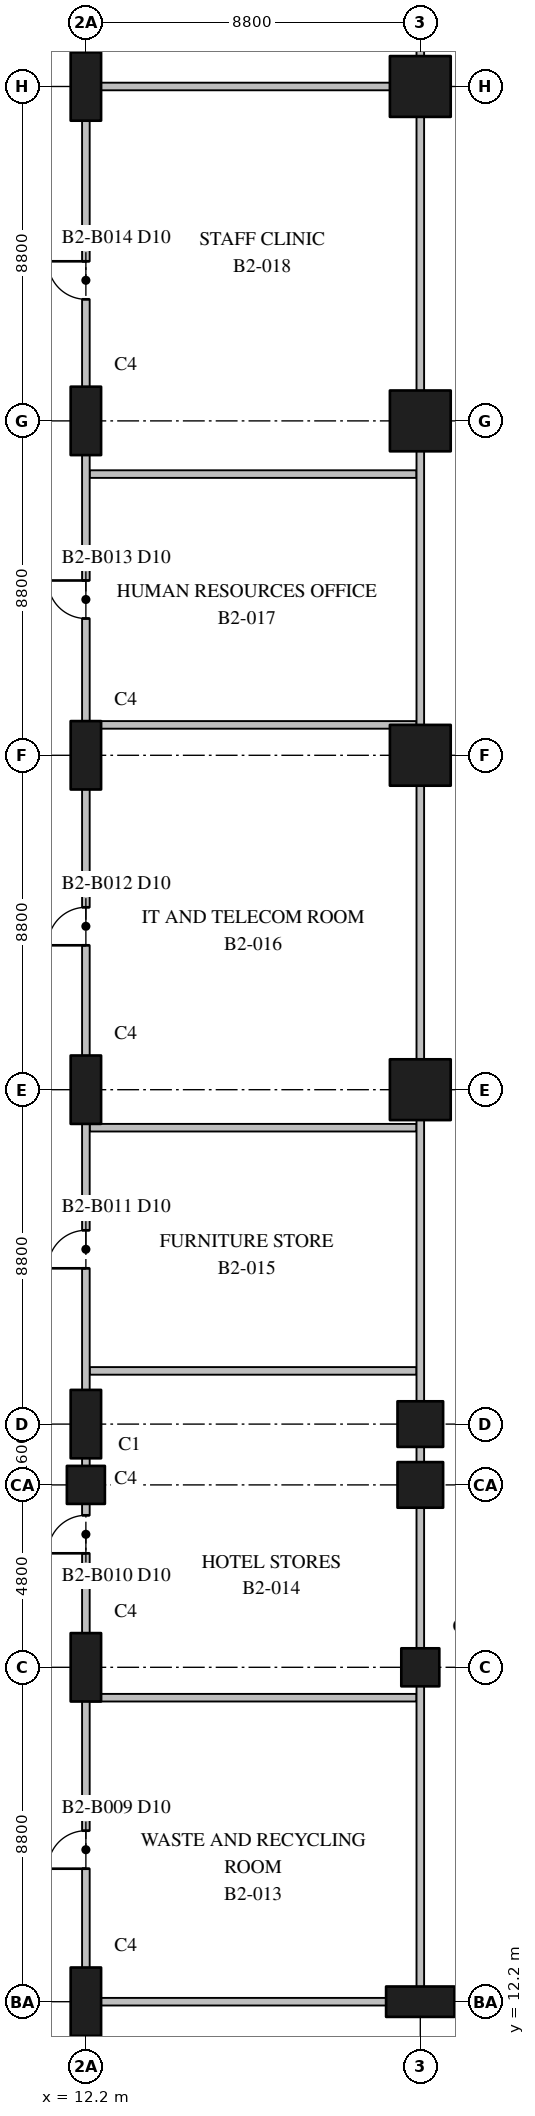
"""IFC4 building model, lengths in metres.
Left out: names, types, materials, properties, quantities, classifications, styles, units other than length and angle.
Written with IfcOpenShell. Run it as: python <this file> out.ifc"""

import sys

from ifc_helpers import new_model, si_unit, direction, frame, frame_2d, origin, origin_2d, place, context, subcontext, project, spatial, rectangle, extrude, element, fill, save


model = new_model("IFC4")
c1 = context("Model", 3, precision=1e-05, world=origin(), true_north=direction((0.0, 1.0)))
c2 = subcontext(c1, "Body", "Model", "MODEL_VIEW")
j1 = project(units=[si_unit("LENGTHUNIT", "METRE"), si_unit("PLANEANGLEUNIT", "RADIAN")], contexts=[c1])
p1 = place(None, origin())
s1 = spatial("IfcSite", under=j1, at=p1, CompositionType="ELEMENT")
p2 = place(p1, origin())
s2 = spatial("IfcBuilding", under=s1, at=p2, CompositionType="ELEMENT")
p3 = place(p2, frame((0.0, 0.0, -12.0)))
s3 = spatial("IfcBuildingStorey", under=s2, at=p3, CompositionType="ELEMENT", Elevation=-12.0)
for number, where, z_axis, x_axis in (
    (1, (12.2, 12.2, 0.0), (0.0, 0.0, 1.0), (0.0, 1.0, 0.0)),
    (2, (12.2, 21.0, 0.0), (0.0, 0.0, 1.0), (0.0, 1.0, 0.0)),
):
    element("IfcColumn", number, at=place(p3, frame(where, z_axis=z_axis, x_axis=x_axis)), inside=s3, PredefinedType="COLUMN", context=c2, shape_type="SweptSolid", body=[
        extrude(rectangle(XDim=1.8, YDim=0.8, at=origin_2d()), origin(), (0.0, 0.0, 1.0), 5.0),
    ])
p4 = place(p3, frame((12.2, 25.8, 0.0), z_axis=(0.0, 0.0, 1.0), x_axis=(1.0, 0.0, 0.0)))
e3 = element("IfcColumn", 3, at=p4, inside=s3, PredefinedType="COLUMN", context=c2, shape_type="SweptSolid", body=[
    extrude(rectangle(XDim=1.0, YDim=1.0, at=origin_2d()), origin(), (0.0, 0.0, 1.0), 5.0),
])
for number, where, z_axis, x_axis in (
    (4, (12.2, 27.4, 0.0), (0.0, 0.0, 1.0), (0.0, 1.0, 0.0)),
    (5, (12.2, 36.2, 0.0), (0.0, 0.0, 1.0), (0.0, 1.0, 0.0)),
    (6, (12.2, 45.0, 0.0), (0.0, 0.0, 1.0), (0.0, 1.0, 0.0)),
    (7, (12.2, 53.8, 0.0), (0.0, 0.0, 1.0), (0.0, 1.0, 0.0)),
    (8, (12.2, 62.6, 0.0), (0.0, 0.0, 1.0), (0.0, 1.0, 0.0)),
    (9, (21.0, 12.2, 0.0), (0.0, 0.0, 1.0), (1.0, 0.0, 0.0)),
):
    element("IfcColumn", number, at=place(p3, frame(where, z_axis=z_axis, x_axis=x_axis)), inside=s3, PredefinedType="COLUMN", context=c2, shape_type="SweptSolid", body=[
        extrude(rectangle(XDim=1.8, YDim=0.8, at=origin_2d()), origin(), (0.0, 0.0, 1.0), 5.0),
    ])
p5 = place(p3, frame((21.0, 21.0, 0.0), z_axis=(0.0, 0.0, 1.0), x_axis=(1.0, 0.0, 0.0)))
e10 = element("IfcColumn", 10, at=p5, inside=s3, PredefinedType="COLUMN", context=c2, shape_type="SweptSolid", body=[
    extrude(rectangle(XDim=1.0, YDim=1.0, at=origin_2d()), origin(), (0.0, 0.0, 1.0), 5.0),
])
for number, where, z_axis, x_axis in (
    (11, (21.0, 25.8, 0.0), (0.0, 0.0, 1.0), (1.0, 0.0, 0.0)),
    (12, (21.0, 27.4, 0.0), (0.0, 0.0, 1.0), (1.0, 0.0, 0.0)),
):
    element("IfcColumn", number, at=place(p3, frame(where, z_axis=z_axis, x_axis=x_axis)), inside=s3, PredefinedType="COLUMN", context=c2, shape_type="SweptSolid", body=[
        extrude(rectangle(XDim=1.2, YDim=1.2, at=origin_2d()), origin(), (0.0, 0.0, 1.0), 5.0),
    ])
for number, where, z_axis, x_axis in (
    (13, (21.0, 36.2, 0.0), (0.0, 0.0, 1.0), (1.0, 0.0, 0.0)),
    (14, (21.0, 45.0, 0.0), (0.0, 0.0, 1.0), (1.0, 0.0, 0.0)),
    (15, (21.0, 53.8, 0.0), (0.0, 0.0, 1.0), (1.0, 0.0, 0.0)),
    (16, (21.0, 62.6, 0.0), (0.0, 0.0, 1.0), (1.0, 0.0, 0.0)),
):
    element("IfcColumn", number, at=place(p3, frame(where, z_axis=z_axis, x_axis=x_axis)), inside=s3, PredefinedType="COLUMN", context=c2, shape_type="SweptSolid", body=[
        extrude(rectangle(XDim=1.6, YDim=1.6, at=origin_2d()), origin(), (0.0, 0.0, 1.0), 5.0),
    ])
p6 = place(p3, frame((12.1, 12.2, 0.0), z_axis=(0.0, 0.0, 1.0), x_axis=(1.0, 0.0, 0.0)))
e17 = element("IfcWall", 17, at=p6, inside=s3, PredefinedType="PARTITIONING", context=c2, shape_type="SweptSolid", body=[
    extrude(rectangle(XDim=9.0, YDim=0.2, at=frame_2d((4.5, 0.0))), origin(), (0.0, 0.0, 1.0), 4.598),
])
for number, where, z_axis, x_axis in (
    (18, (12.3, 20.2, 0.0), (0.0, 0.0, 1.0), (1.0, 0.0, 0.0)),
    (19, (12.3, 28.8, 0.0), (0.0, 0.0, 1.0), (1.0, 0.0, 0.0)),
    (20, (12.3, 35.2, 0.0), (0.0, 0.0, 1.0), (1.0, 0.0, 0.0)),
    (21, (12.3, 45.8, 0.0), (0.0, 0.0, 1.0), (1.0, 0.0, 0.0)),
    (22, (12.3, 52.4, 0.0), (0.0, 0.0, 1.0), (1.0, 0.0, 0.0)),
    (23, (12.3, 62.6, 0.0), (0.0, 0.0, 1.0), (1.0, 0.0, 0.0)),
):
    element("IfcWall", number, at=place(p3, frame(where, z_axis=z_axis, x_axis=x_axis)), inside=s3, PredefinedType="PARTITIONING", context=c2, shape_type="SweptSolid", body=[
        extrude(rectangle(XDim=8.6, YDim=0.2, at=frame_2d((4.3, 0.0))), origin(), (0.0, 0.0, 1.0), 4.598),
    ])
p7 = place(p3, frame((12.2, 12.3, 0.0), z_axis=(0.0, 0.0, 1.0), x_axis=(0.0, 1.0, 0.0)))
e24 = element("IfcWall", 24, at=p7, inside=s3, PredefinedType="PARTITIONING", context=c2, shape_type="SweptSolid", body=[
    extrude(rectangle(XDim=63.8, YDim=0.2, at=frame_2d((31.9, 0.0))), origin(), (0.0, 0.0, 1.0), 4.598),
])
p8 = place(p7, frame((3.4, 0.0, 0.0)))
e25 = element("IfcOpeningElement", 25, at=p8, cuts=e24, PredefinedType="OPENING", context=c2, shape_type="SweptSolid", body=[
    extrude(rectangle(XDim=1.0, YDim=2.1, at=frame_2d((0.5, 1.05))), frame((0.0, 0.11, 0.0), z_axis=(0.0, -1.0, 0.0), x_axis=(1.0, 0.0, 0.0)), (0.0, 0.0, 1.0), 0.22),
])
p9 = place(p7, frame((11.7, 0.0, 0.0)))
e26 = element("IfcOpeningElement", 26, at=p9, cuts=e24, PredefinedType="OPENING", context=c2, shape_type="SweptSolid", body=[
    extrude(rectangle(XDim=1.0, YDim=2.1, at=frame_2d((0.5, 1.05))), frame((0.0, 0.11, 0.0), z_axis=(0.0, -1.0, 0.0), x_axis=(1.0, 0.0, 0.0)), (0.0, 0.0, 1.0), 0.22),
])
p10 = place(p7, frame((19.2, 0.0, 0.0)))
e27 = element("IfcOpeningElement", 27, at=p10, cuts=e24, PredefinedType="OPENING", context=c2, shape_type="SweptSolid", body=[
    extrude(rectangle(XDim=1.0, YDim=2.1, at=frame_2d((0.5, 1.05))), frame((0.0, 0.11, 0.0), z_axis=(0.0, -1.0, 0.0), x_axis=(1.0, 0.0, 0.0)), (0.0, 0.0, 1.0), 0.22),
])
p11 = place(p7, frame((27.7, 0.0, 0.0)))
e28 = element("IfcOpeningElement", 28, at=p11, cuts=e24, PredefinedType="OPENING", context=c2, shape_type="SweptSolid", body=[
    extrude(rectangle(XDim=1.0, YDim=2.1, at=frame_2d((0.5, 1.05))), frame((0.0, 0.11, 0.0), z_axis=(0.0, -1.0, 0.0), x_axis=(1.0, 0.0, 0.0)), (0.0, 0.0, 1.0), 0.22),
])
p12 = place(p7, frame((36.3, 0.0, 0.0)))
e29 = element("IfcOpeningElement", 29, at=p12, cuts=e24, PredefinedType="OPENING", context=c2, shape_type="SweptSolid", body=[
    extrude(rectangle(XDim=1.0, YDim=2.1, at=frame_2d((0.5, 1.05))), frame((0.0, 0.11, 0.0), z_axis=(0.0, -1.0, 0.0), x_axis=(1.0, 0.0, 0.0)), (0.0, 0.0, 1.0), 0.22),
])
p13 = place(p7, frame((44.7, 0.0, 0.0)))
e30 = element("IfcOpeningElement", 30, at=p13, cuts=e24, PredefinedType="OPENING", context=c2, shape_type="SweptSolid", body=[
    extrude(rectangle(XDim=1.0, YDim=2.1, at=frame_2d((0.5, 1.05))), frame((0.0, 0.11, 0.0), z_axis=(0.0, -1.0, 0.0), x_axis=(1.0, 0.0, 0.0)), (0.0, 0.0, 1.0), 0.22),
])
p14 = place(p7, frame((54.2, 0.0, 0.0)))
e31 = element("IfcOpeningElement", 31, at=p14, cuts=e24, PredefinedType="OPENING", context=c2, shape_type="SweptSolid", body=[
    extrude(rectangle(XDim=1.0, YDim=2.1, at=frame_2d((0.5, 1.05))), frame((0.0, 0.11, 0.0), z_axis=(0.0, -1.0, 0.0), x_axis=(1.0, 0.0, 0.0)), (0.0, 0.0, 1.0), 0.22),
])
p15 = place(p7, frame((61.0, 0.0, 0.0)))
e32 = element("IfcOpeningElement", 32, at=p15, cuts=e24, PredefinedType="OPENING", context=c2, shape_type="SweptSolid", body=[
    extrude(rectangle(XDim=1.0, YDim=2.1, at=frame_2d((0.5, 1.05))), frame((0.0, 0.11, 0.0), z_axis=(0.0, -1.0, 0.0), x_axis=(1.0, 0.0, 0.0)), (0.0, 0.0, 1.0), 0.22),
])
p16 = place(p3, frame((21.0, 12.3, 0.0), z_axis=(0.0, 0.0, 1.0), x_axis=(0.0, 1.0, 0.0)))
e33 = element("IfcWall", 33, at=p16, inside=s3, PredefinedType="PARTITIONING", context=c2, shape_type="SweptSolid", body=[
    extrude(rectangle(XDim=63.8, YDim=0.2, at=frame_2d((31.9, 0.0))), origin(), (0.0, 0.0, 1.0), 4.598),
])
p17 = place(p8, origin())
e34 = element("IfcDoor", 34, at=p17, inside=s3, OperationType="SINGLE_SWING_LEFT", PredefinedType="DOOR", context=c2, shape_type="SweptSolid", body=[
    extrude(rectangle(XDim=1.0, YDim=2.1, at=frame_2d((0.5, 1.05))), frame((0.0, 0.025, 0.0), z_axis=(0.0, -1.0, 0.0), x_axis=(1.0, 0.0, 0.0)), (0.0, 0.0, 1.0), 0.05),
])
fill(e25, e34)
p18 = place(p9, origin())
e35 = element("IfcDoor", 35, at=p18, inside=s3, OperationType="SINGLE_SWING_LEFT", PredefinedType="DOOR", context=c2, shape_type="SweptSolid", body=[
    extrude(rectangle(XDim=1.0, YDim=2.1, at=frame_2d((0.5, 1.05))), frame((0.0, 0.025, 0.0), z_axis=(0.0, -1.0, 0.0), x_axis=(1.0, 0.0, 0.0)), (0.0, 0.0, 1.0), 0.05),
])
fill(e26, e35)
p19 = place(p10, origin())
e36 = element("IfcDoor", 36, at=p19, inside=s3, OperationType="SINGLE_SWING_LEFT", PredefinedType="DOOR", context=c2, shape_type="SweptSolid", body=[
    extrude(rectangle(XDim=1.0, YDim=2.1, at=frame_2d((0.5, 1.05))), frame((0.0, 0.025, 0.0), z_axis=(0.0, -1.0, 0.0), x_axis=(1.0, 0.0, 0.0)), (0.0, 0.0, 1.0), 0.05),
])
fill(e27, e36)
p20 = place(p11, origin())
e37 = element("IfcDoor", 37, at=p20, inside=s3, OperationType="SINGLE_SWING_LEFT", PredefinedType="DOOR", context=c2, shape_type="SweptSolid", body=[
    extrude(rectangle(XDim=1.0, YDim=2.1, at=frame_2d((0.5, 1.05))), frame((0.0, 0.025, 0.0), z_axis=(0.0, -1.0, 0.0), x_axis=(1.0, 0.0, 0.0)), (0.0, 0.0, 1.0), 0.05),
])
fill(e28, e37)
p21 = place(p12, origin())
e38 = element("IfcDoor", 38, at=p21, inside=s3, OperationType="SINGLE_SWING_RIGHT", PredefinedType="DOOR", context=c2, shape_type="SweptSolid", body=[
    extrude(rectangle(XDim=1.0, YDim=2.1, at=frame_2d((0.5, 1.05))), frame((0.0, 0.025, 0.0), z_axis=(0.0, -1.0, 0.0), x_axis=(1.0, 0.0, 0.0)), (0.0, 0.0, 1.0), 0.05),
])
fill(e29, e38)
p22 = place(p13, origin())
e39 = element("IfcDoor", 39, at=p22, inside=s3, OperationType="SINGLE_SWING_RIGHT", PredefinedType="DOOR", context=c2, shape_type="SweptSolid", body=[
    extrude(rectangle(XDim=1.0, YDim=2.1, at=frame_2d((0.5, 1.05))), frame((0.0, 0.025, 0.0), z_axis=(0.0, -1.0, 0.0), x_axis=(1.0, 0.0, 0.0)), (0.0, 0.0, 1.0), 0.05),
])
fill(e30, e39)
save(model, sys.argv[1])
